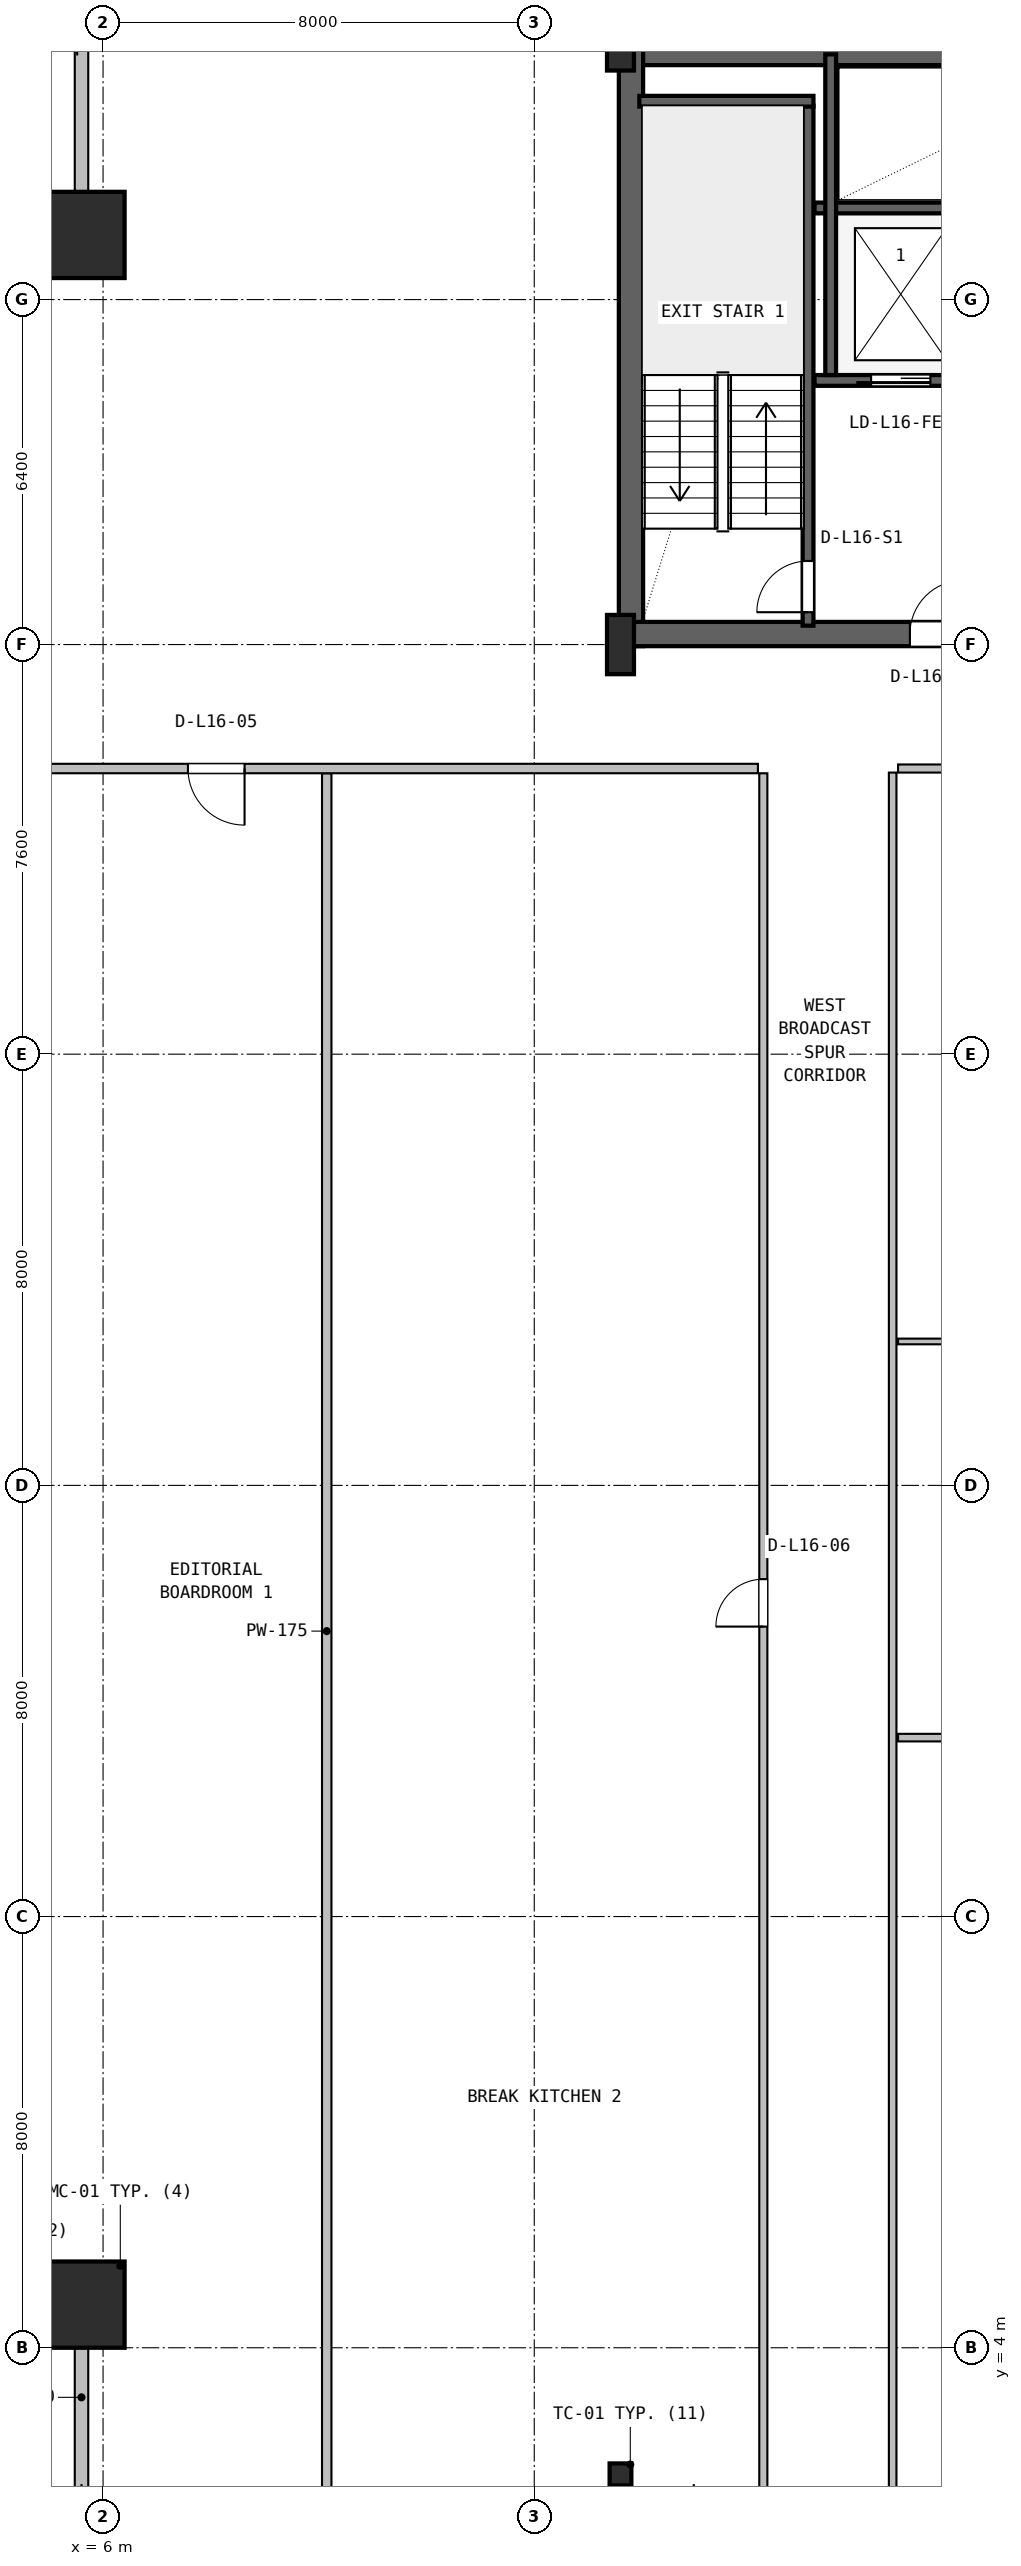
"""IFC4 building model, lengths in metres.
Left out: names, types, materials, properties, quantities, classifications, styles, units other than length and angle.
Written with IfcOpenShell. Run it as: python <this file> out.ifc"""

import sys

from ifc_helpers import new_model, si_unit, direction, frame, frame_2d, origin, origin_2d, place, context, subcontext, project, spatial, rectangle, hollow_rectangle, i_section, extrude, source, transform, mapped, element, fill, save


model = new_model("IFC4")
c1 = context("Model", 3, precision=1e-05, world=origin(), true_north=direction((0.0, 1.0)))
c2 = subcontext(c1, "Body", "Model", "MODEL_VIEW")
j1 = project(units=[si_unit("LENGTHUNIT", "METRE"), si_unit("PLANEANGLEUNIT", "RADIAN")], contexts=[c1])
p1 = place(None, origin())
s1 = spatial("IfcSite", under=j1, at=p1, CompositionType="ELEMENT")
p2 = place(p1, origin())
s2 = spatial("IfcBuilding", under=s1, at=p2, CompositionType="ELEMENT")
p3 = place(p2, frame((0.0, 0.0, 70.5)))
s3 = spatial("IfcBuildingStorey", under=s2, at=p3, CompositionType="ELEMENT", Elevation=70.5)
p4 = place(p3, frame((15.6, 46.575, 0.0), z_axis=(0.0, 0.0, 1.0), x_axis=(1.0, 0.0, 0.0)))
e1 = element("IfcWall", 1, at=p4, inside=s3, PredefinedType="SHEAR", context=c2, shape_type="SweptSolid", body=[
    extrude(rectangle(XDim=36.8, YDim=0.45, at=frame_2d((18.4, 0.0))), origin(), (0.0, 0.0, 1.0), 3.65),
])
p5 = place(p3, frame((15.795, 35.57, 0.0), z_axis=(0.0, 0.0, 1.0), x_axis=(0.0, 1.0, 0.0)))
e2 = element("IfcWall", 2, at=p5, inside=s3, PredefinedType="SHEAR", context=c2, shape_type="SweptSolid", body=[
    extrude(rectangle(XDim=11.23, YDim=0.45, at=frame_2d((5.615, 0.0))), origin(), (0.0, 0.0, 1.0), 3.65),
])
p6 = place(p3, frame((15.57, 35.795, 0.0), z_axis=(0.0, 0.0, 1.0), x_axis=(1.0, 0.0, 0.0)))
e3 = element("IfcWall", 3, at=p6, inside=s3, PredefinedType="SHEAR", context=c2, shape_type="SweptSolid", body=[
    extrude(rectangle(XDim=9.23, YDim=0.45, at=frame_2d((4.615, 0.0))), origin(), (0.0, 0.0, 1.0), 3.65),
])
p7 = place(p6, frame((5.4, 0.0, 0.0)))
e4 = element("IfcOpeningElement", 4, at=p7, cuts=e3, PredefinedType="OPENING", context=c2, shape_type="SweptSolid", body=[
    extrude(rectangle(XDim=1.0, YDim=2.1, at=frame_2d((0.5, 1.05))), frame((0.0, 0.235, 0.0), z_axis=(0.0, -1.0, 0.0), x_axis=(1.0, 0.0, 0.0)), (0.0, 0.0, 1.0), 0.47),
])
m1 = source(origin(), c2, "Body", "SweptSolid", [
    extrude(i_section(OverallWidth=0.5, OverallDepth=1.1, WebThickness=0.018, FlangeThickness=0.032, FilletRadius=0.018, at=origin_2d()), origin(), (0.0, 0.0, 1.0), 3.9),
])
for number, where, z_axis, x_axis in (
    (5, (15.6, 35.6, 0.0), (0.0, 0.0, 1.0), (1.0, 0.0, 0.0)),
    (6, (15.6, 46.8, 0.0), (0.0, 0.0, 1.0), (1.0, 0.0, 0.0)),
):
    element("IfcColumn", number, at=place(p3, frame(where, z_axis=z_axis, x_axis=x_axis)), inside=s3, PredefinedType="COLUMN", context=c2, shape_type="MappedRepresentation", body=[
        mapped(m1, transform((0.0, 0.0, 0.0), x_axis=(1.0, 0.0, 0.0), y_axis=(0.0, 1.0, 0.0), z_axis=(0.0, 0.0, 1.0), scale=1.0)),
    ])
m2 = source(origin(), c2, "Body", "SweptSolid", [
    extrude(hollow_rectangle(XDim=1.6, YDim=1.6, WallThickness=0.06, at=origin_2d()), origin(), (0.0, 0.0, 1.0), 3.9),
])
for number, where, z_axis, x_axis in (
    (7, (5.6, 4.8, 0.0), (0.0, 0.0, 1.0), (1.0, 0.0, 0.0)),
    (8, (5.6, 43.2, 0.0), (0.0, 0.0, 1.0), (1.0, 0.0, 0.0)),
):
    element("IfcColumn", number, at=place(p3, frame(where, z_axis=z_axis, x_axis=x_axis)), inside=s3, PredefinedType="COLUMN", context=c2, shape_type="MappedRepresentation", body=[
        mapped(m2, transform((0.0, 0.0, 0.0), x_axis=(1.0, 0.0, 0.0), y_axis=(0.0, 1.0, 0.0), z_axis=(0.0, 0.0, 1.0), scale=1.0)),
    ])
m3 = source(origin(), c2, "Body", "SweptSolid", [
    extrude(i_section(OverallWidth=0.404, OverallDepth=0.407, WebThickness=0.027, FlangeThickness=0.044, FilletRadius=0.018, at=origin_2d()), origin(), (0.0, 0.0, 1.0), 3.9),
])
p8 = place(p3, frame((15.6, 1.65, 0.0), z_axis=(0.0, 0.0, 1.0), x_axis=(1.0, 0.0, 0.0)))
e9 = element("IfcColumn", 9, at=p8, inside=s3, PredefinedType="COLUMN", context=c2, shape_type="MappedRepresentation", body=[
    mapped(m3, transform((0.0, 0.0, 0.0), x_axis=(1.0, 0.0, 0.0), y_axis=(0.0, 1.0, 0.0), z_axis=(0.0, 0.0, 1.0), scale=1.0)),
])
p9 = place(p3, frame((5.6, 1.28, 0.0), z_axis=(0.0, 0.0, 1.0), x_axis=(0.0, 1.0, 0.0)))
e10 = element("IfcWall", 10, at=p9, inside=s3, PredefinedType="SOLIDWALL", context=c2, shape_type="SweptSolid", body=[
    extrude(rectangle(XDim=3.6, YDim=0.25, at=frame_2d((1.8, 0.0))), origin(), (0.0, 0.0, 1.0), 3.208),
])
p10 = place(p3, frame((2.08, 43.2, 0.0), z_axis=(0.0, 0.0, 1.0), x_axis=(1.0, 0.0, 0.0)))
e11 = element("IfcWall", 11, at=p10, inside=s3, PredefinedType="SOLIDWALL", context=c2, shape_type="SweptSolid", body=[
    extrude(rectangle(XDim=3.39, YDim=0.25, at=frame_2d((1.695, 0.0))), origin(), (0.0, 0.0, 1.0), 3.63),
])
p11 = place(p3, frame((5.6, 43.12, 0.0), z_axis=(0.0, 0.0, 1.0), x_axis=(0.0, 1.0, 0.0)))
e12 = element("IfcWall", 12, at=p11, inside=s3, PredefinedType="SOLIDWALL", context=c2, shape_type="SweptSolid", body=[
    extrude(rectangle(XDim=3.6, YDim=0.25, at=frame_2d((1.8, 0.0))), origin(), (0.0, 0.0, 1.0), 3.208),
])
p12 = place(p3, frame((19.08, 35.95, 0.0), z_axis=(0.0, 0.0, 1.0), x_axis=(0.0, 1.0, 0.0)))
e13 = element("IfcWall", 13, at=p12, inside=s3, PredefinedType="SHEAR", context=c2, shape_type="SweptSolid", body=[
    extrude(rectangle(XDim=9.65, YDim=0.2, at=frame_2d((4.825, 0.0))), origin(), (0.0, 0.0, 1.0), 3.65),
])
p13 = place(p12, frame((0.25, 0.0, 0.0)))
e14 = element("IfcOpeningElement", 14, at=p13, cuts=e13, PredefinedType="OPENING", context=c2, shape_type="SweptSolid", body=[
    extrude(rectangle(XDim=0.95, YDim=2.1, at=frame_2d((0.475, 1.05))), frame((0.0, 0.11, 0.0), z_axis=(0.0, -1.0, 0.0), x_axis=(1.0, 0.0, 0.0)), (0.0, 0.0, 1.0), 0.22),
])
p14 = place(p3, frame((15.95, 45.68, 0.0), z_axis=(0.0, 0.0, 1.0), x_axis=(1.0, 0.0, 0.0)))
e15 = element("IfcWall", 15, at=p14, inside=s3, PredefinedType="SHEAR", context=c2, shape_type="SweptSolid", body=[
    extrude(rectangle(XDim=3.23, YDim=0.2, at=frame_2d((1.615, 0.0))), origin(), (0.0, 0.0, 1.0), 3.65),
])
p15 = place(p3, frame((19.2, 40.5, 0.0), z_axis=(0.0, 0.0, 1.0), x_axis=(1.0, 0.0, 0.0)))
e16 = element("IfcWall", 16, at=p15, inside=s3, PredefinedType="SHEAR", context=c2, shape_type="SweptSolid", body=[
    extrude(rectangle(XDim=5.52, YDim=0.2, at=frame_2d((2.76, 0.0))), origin(), (0.0, 0.0, 1.0), 3.65),
])
p16 = place(p15, frame((1.05, 0.0, 0.0)))
e17 = element("IfcOpeningElement", 17, at=p16, cuts=e16, PredefinedType="OPENING", context=c2, shape_type="SweptSolid", body=[
    extrude(rectangle(XDim=1.1, YDim=2.18, at=frame_2d((0.55, 1.09))), frame((0.0, 0.11, 0.0), z_axis=(0.0, -1.0, 0.0), x_axis=(1.0, 0.0, 0.0)), (0.0, 0.0, 1.0), 0.22),
])
p17 = place(p15, frame((3.65, 0.0, 0.0)))
e18 = element("IfcOpeningElement", 18, at=p17, cuts=e16, PredefinedType="OPENING", context=c2, shape_type="SweptSolid", body=[
    extrude(rectangle(XDim=1.1, YDim=2.18, at=frame_2d((0.55, 1.09))), frame((0.0, 0.11, 0.0), z_axis=(0.0, -1.0, 0.0), x_axis=(1.0, 0.0, 0.0)), (0.0, 0.0, 1.0), 0.22),
])
p18 = place(p3, frame((19.2, 43.7, 0.0), z_axis=(0.0, 0.0, 1.0), x_axis=(1.0, 0.0, 0.0)))
e19 = element("IfcWall", 19, at=p18, inside=s3, PredefinedType="SHEAR", context=c2, shape_type="SweptSolid", body=[
    extrude(rectangle(XDim=5.52, YDim=0.2, at=frame_2d((2.76, 0.0))), origin(), (0.0, 0.0, 1.0), 3.65),
])
p19 = place(p3, frame((19.5, 40.6, 0.0), z_axis=(0.0, 0.0, 1.0), x_axis=(0.0, 1.0, 0.0)))
e20 = element("IfcWall", 20, at=p19, inside=s3, PredefinedType="SHEAR", context=c2, shape_type="SweptSolid", body=[
    extrude(rectangle(XDim=5.95, YDim=0.2, at=frame_2d((2.975, 0.0))), origin(), (0.0, 0.0, 1.0), 3.65),
])
p20 = place(p3, frame((10.15, 1.38, 0.0), z_axis=(0.0, 0.0, 1.0), x_axis=(0.0, 1.0, 0.0)))
e21 = element("IfcWall", 21, at=p20, inside=s3, PredefinedType="PARTITIONING", context=c2, shape_type="SweptSolid", body=[
    extrude(rectangle(XDim=31.832, YDim=0.175, at=frame_2d((15.916, 0.0))), origin(), (0.0, 0.0, 1.0), 3.208),
])
p21 = place(p3, frame((2.18, 33.3, 0.0), z_axis=(0.0, 0.0, 1.0), x_axis=(1.0, 0.0, 0.0)))
e22 = element("IfcWall", 22, at=p21, inside=s3, PredefinedType="PARTITIONING", context=c2, shape_type="SweptSolid", body=[
    extrude(rectangle(XDim=15.97, YDim=0.175, at=frame_2d((7.985, 0.0))), origin(), (0.0, 0.0, 1.0), 3.208),
])
p22 = place(p21, frame((5.395, 0.0, 0.0)))
e23 = element("IfcOpeningElement", 23, at=p22, cuts=e22, PredefinedType="OPENING", context=c2, shape_type="SweptSolid", body=[
    extrude(rectangle(XDim=1.05, YDim=2.1, at=frame_2d((0.525, 1.05))), frame((0.0, 0.098, 0.0), z_axis=(0.0, -1.0, 0.0), x_axis=(1.0, 0.0, 0.0)), (0.0, 0.0, 1.0), 0.195),
])
p23 = place(p3, frame((18.25, 1.38, 0.0), z_axis=(0.0, 0.0, 1.0), x_axis=(0.0, 1.0, 0.0)))
e24 = element("IfcWall", 24, at=p23, inside=s3, PredefinedType="PARTITIONING", context=c2, shape_type="SweptSolid", body=[
    extrude(rectangle(XDim=31.832, YDim=0.15, at=frame_2d((15.916, 0.0))), origin(), (0.0, 0.0, 1.0), 3.208),
])
p24 = place(p23, frame((16.0, 0.0, 0.0)))
e25 = element("IfcOpeningElement", 25, at=p24, cuts=e24, PredefinedType="OPENING", context=c2, shape_type="SweptSolid", body=[
    extrude(rectangle(XDim=0.88, YDim=2.06, at=frame_2d((0.44, 1.03))), frame((0.0, 0.085, 0.0), z_axis=(0.0, -1.0, 0.0), x_axis=(1.0, 0.0, 0.0)), (0.0, 0.0, 1.0), 0.17),
])
p25 = place(p3, frame((20.75, 15.32, 0.0), z_axis=(0.0, 0.0, 1.0), x_axis=(1.0, 0.0, 0.0)))
e26 = element("IfcWall", 26, at=p25, inside=s3, PredefinedType="PARTITIONING", context=c2, shape_type="SweptSolid", body=[
    extrude(rectangle(XDim=23.96, YDim=0.14, at=frame_2d((11.98, 0.0))), origin(), (0.0, 0.0, 1.0), 2.852),
])
p26 = place(p3, frame((20.65, 1.38, 0.0), z_axis=(0.0, 0.0, 1.0), x_axis=(0.0, 1.0, 0.0)))
e27 = element("IfcWall", 27, at=p26, inside=s3, PredefinedType="PARTITIONING", context=c2, shape_type="SweptSolid", body=[
    extrude(rectangle(XDim=31.845, YDim=0.14, at=frame_2d((15.923, 0.0))), origin(), (0.0, 0.0, 1.0), 3.208),
])
p27 = place(p3, frame((20.75, 22.67, 0.0), z_axis=(0.0, 0.0, 1.0), x_axis=(1.0, 0.0, 0.0)))
e28 = element("IfcWall", 28, at=p27, inside=s3, PredefinedType="PARTITIONING", context=c2, shape_type="SweptSolid", body=[
    extrude(rectangle(XDim=23.96, YDim=0.105, at=frame_2d((11.98, 0.0))), origin(), (0.0, 0.0, 1.0), 2.852),
])
p28 = place(p3, frame((20.75, 33.3, 0.0), z_axis=(0.0, 0.0, 1.0), x_axis=(1.0, 0.0, 0.0)))
e29 = element("IfcWall", 29, at=p28, inside=s3, PredefinedType="PARTITIONING", context=c2, shape_type="SweptSolid", body=[
    extrude(rectangle(XDim=23.96, YDim=0.15, at=frame_2d((11.98, 0.0))), origin(), (0.0, 0.0, 1.0), 2.852),
])
p29 = place(p28, frame((11.52, 0.0, 0.0)))
e30 = element("IfcOpeningElement", 30, at=p29, cuts=e29, PredefinedType="OPENING", context=c2, shape_type="SweptSolid", body=[
    extrude(rectangle(XDim=0.92, YDim=2.08, at=frame_2d((0.46, 1.04))), frame((0.0, 0.085, 0.0), z_axis=(0.0, -1.0, 0.0), x_axis=(1.0, 0.0, 0.0)), (0.0, 0.0, 1.0), 0.17),
])
m4 = source(origin(), c2, "Body", "SweptSolid", [
    extrude(rectangle(XDim=0.95, YDim=2.1, at=frame_2d((0.475, 1.05))), frame((0.0, 0.025, 0.0), z_axis=(0.0, -1.0, 0.0), x_axis=(1.0, 0.0, 0.0)), (0.0, 0.0, 1.0), 0.05),
])
p30 = place(p13, origin())
e31 = element("IfcDoor", 31, at=p30, inside=s3, OperationType="SINGLE_SWING_LEFT", PredefinedType="DOOR", context=c2, shape_type="MappedRepresentation", body=[
    mapped(m4, transform((0.0, 0.0, 0.0), x_axis=(1.0, 0.0, 0.0), y_axis=(0.0, 1.0, 0.0), z_axis=(0.0, 0.0, 1.0), scale=1.0)),
])
fill(e14, e31)
m5 = source(origin(), c2, "Body", "SweptSolid", [
    extrude(rectangle(XDim=1.0, YDim=2.1, at=frame_2d((0.5, 1.05))), frame((0.0, 0.025, 0.0), z_axis=(0.0, -1.0, 0.0), x_axis=(1.0, 0.0, 0.0)), (0.0, 0.0, 1.0), 0.05),
])
p31 = place(p7, origin())
e32 = element("IfcDoor", 32, at=p31, inside=s3, OperationType="SINGLE_SWING_RIGHT", PredefinedType="DOOR", context=c2, shape_type="MappedRepresentation", body=[
    mapped(m5, transform((0.0, 0.0, 0.0), x_axis=(1.0, 0.0, 0.0), y_axis=(0.0, 1.0, 0.0), z_axis=(0.0, 0.0, 1.0), scale=1.0)),
])
fill(e4, e32)
m6 = source(origin(), c2, "Body", "SweptSolid", [
    extrude(rectangle(XDim=1.1, YDim=2.18, at=frame_2d((0.55, 1.09))), frame((0.0, 0.025, 0.0), z_axis=(0.0, -1.0, 0.0), x_axis=(1.0, 0.0, 0.0)), (0.0, 0.0, 1.0), 0.05),
])
p32 = place(p16, frame((1.1, 0.0, 0.0), z_axis=(0.0, 0.0, 1.0), x_axis=(-1.0, 0.0, 0.0)))
e33 = element("IfcDoor", 33, at=p32, inside=s3, OperationType="SLIDING_TO_LEFT", PredefinedType="DOOR", context=c2, shape_type="MappedRepresentation", body=[
    mapped(m6, transform((0.0, 0.0, 0.0), x_axis=(1.0, 0.0, 0.0), y_axis=(0.0, 1.0, 0.0), z_axis=(0.0, 0.0, 1.0), scale=1.0)),
])
fill(e17, e33)
m7 = source(origin(), c2, "Body", "SweptSolid", [
    extrude(rectangle(XDim=1.05, YDim=2.1, at=frame_2d((0.525, 1.05))), frame((0.0, 0.025, 0.0), z_axis=(0.0, -1.0, 0.0), x_axis=(1.0, 0.0, 0.0)), (0.0, 0.0, 1.0), 0.05),
])
p33 = place(p22, frame((1.05, 0.0, 0.0), z_axis=(0.0, 0.0, 1.0), x_axis=(-1.0, 0.0, 0.0)))
e34 = element("IfcDoor", 34, at=p33, inside=s3, OperationType="SINGLE_SWING_RIGHT", PredefinedType="DOOR", context=c2, shape_type="MappedRepresentation", body=[
    mapped(m7, transform((0.0, 0.0, 0.0), x_axis=(1.0, 0.0, 0.0), y_axis=(0.0, 1.0, 0.0), z_axis=(0.0, 0.0, 1.0), scale=1.0)),
])
fill(e23, e34)
m8 = source(origin(), c2, "Body", "SweptSolid", [
    extrude(rectangle(XDim=0.88, YDim=2.06, at=frame_2d((0.44, 1.03))), frame((0.0, 0.025, 0.0), z_axis=(0.0, -1.0, 0.0), x_axis=(1.0, 0.0, 0.0)), (0.0, 0.0, 1.0), 0.05),
])
p34 = place(p24, origin())
e35 = element("IfcDoor", 35, at=p34, inside=s3, OperationType="SINGLE_SWING_LEFT", PredefinedType="DOOR", context=c2, shape_type="MappedRepresentation", body=[
    mapped(m8, transform((0.0, 0.0, 0.0), x_axis=(1.0, 0.0, 0.0), y_axis=(0.0, 1.0, 0.0), z_axis=(0.0, 0.0, 1.0), scale=1.0)),
])
fill(e25, e35)
save(model, sys.argv[1])
